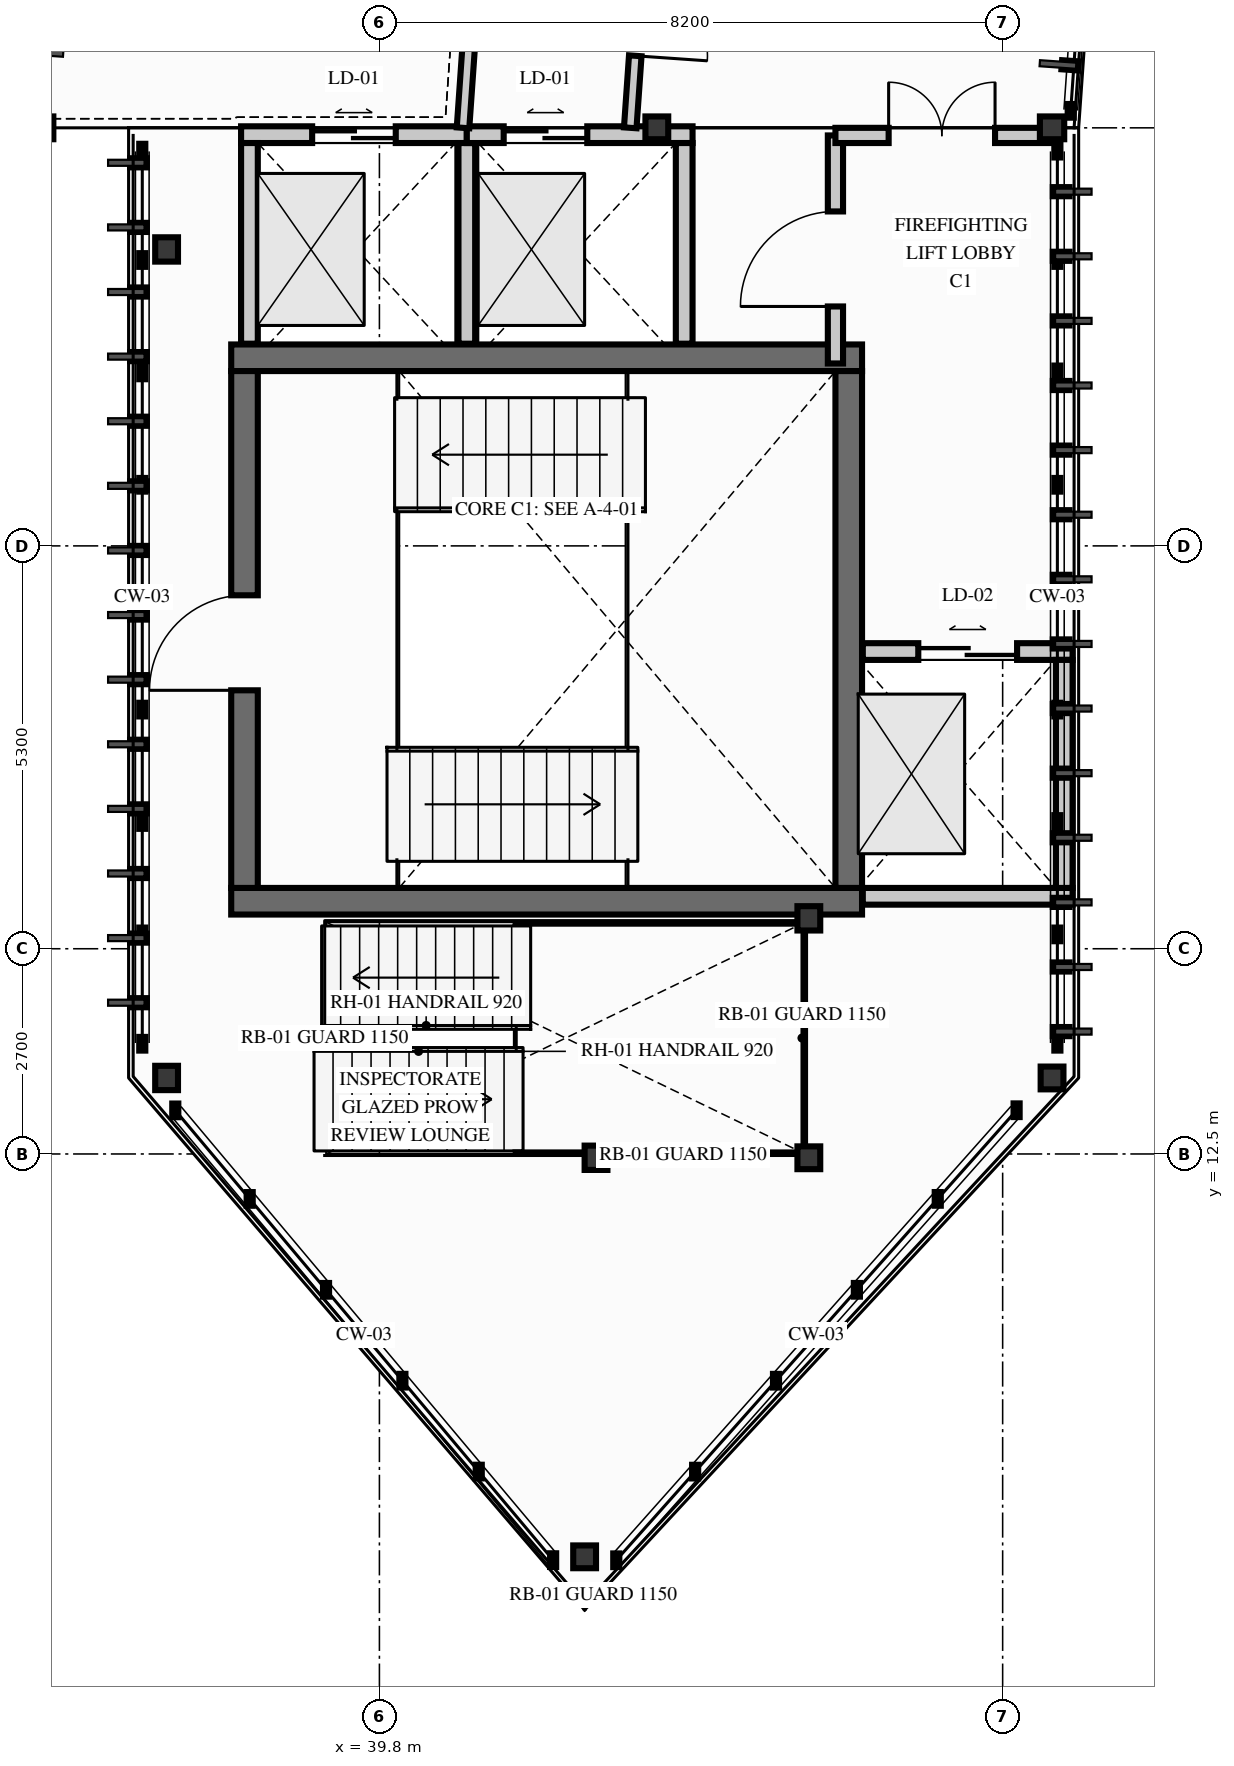
"""IFC4 building model, lengths in metres.
Left out: names, types, materials, properties, quantities, classifications, styles, units other than length and angle.
Written with IfcOpenShell. Run it as: python <this file> out.ifc"""

import sys

from ifc_helpers import new_model, si_unit, direction, frame, frame_2d, origin, origin_2d, place, context, subcontext, project, spatial, rectangle, i_section, extrude, element, fill, save


model = new_model("IFC4")
c1 = context("Model", 3, precision=1e-05, world=origin(), true_north=direction((0.0, 1.0)))
c2 = subcontext(c1, "Body", "Model", "MODEL_VIEW")
j1 = project(units=[si_unit("LENGTHUNIT", "METRE"), si_unit("PLANEANGLEUNIT", "RADIAN")], contexts=[c1])
p1 = place(None, origin())
s1 = spatial("IfcSite", under=j1, at=p1, CompositionType="ELEMENT")
p2 = place(p1, origin())
s2 = spatial("IfcBuilding", under=s1, at=p2, CompositionType="ELEMENT")
p3 = place(p2, frame((0.0, 0.0, 21.6)))
s3 = spatial("IfcBuildingStorey", under=s2, at=p3, CompositionType="ELEMENT", Elevation=21.6)
for number, where, z_axis, x_axis in (
    (1, (37.85, 15.825, 0.0), (0.0, 0.0, 1.0), (1.0, 0.0, 0.0)),
    (2, (37.85, 22.975, 0.0), (0.0, 0.0, 1.0), (1.0, 0.0, 0.0)),
):
    element("IfcWall", number, at=place(p3, frame(where, z_axis=z_axis, x_axis=x_axis)), inside=s3, PredefinedType="SHEAR", context=c2, shape_type="SweptSolid", body=[
        extrude(rectangle(XDim=8.3, YDim=0.35, at=frame_2d((4.15, 0.0))), origin(), (0.0, 0.0, 1.0), 3.7),
    ])
p4 = place(p3, frame((38.025, 16.0, 0.0), z_axis=(0.0, 0.0, 1.0), x_axis=(0.0, 1.0, 0.0)))
e3 = element("IfcWall", 3, at=p4, inside=s3, PredefinedType="SHEAR", context=c2, shape_type="SweptSolid", body=[
    extrude(rectangle(XDim=6.8, YDim=0.35, at=frame_2d((3.4, 0.0))), origin(), (0.0, 0.0, 1.0), 3.7),
])
p5 = place(p4, frame((2.6, 0.0, 0.0)))
e4 = element("IfcOpeningElement", 4, at=p5, cuts=e3, PredefinedType="OPENING", context=c2, shape_type="SweptSolid", body=[
    extrude(rectangle(XDim=1.25, YDim=2.2, at=frame_2d((0.625, 1.1))), frame((0.0, 0.185, 0.0), z_axis=(0.0, -1.0, 0.0), x_axis=(1.0, 0.0, 0.0)), (0.0, 0.0, 1.0), 0.37),
])
p6 = place(p3, frame((45.975, 16.0, 0.0), z_axis=(0.0, 0.0, 1.0), x_axis=(0.0, 1.0, 0.0)))
e5 = element("IfcWall", 5, at=p6, inside=s3, PredefinedType="SHEAR", context=c2, shape_type="SweptSolid", body=[
    extrude(rectangle(XDim=6.8, YDim=0.35, at=frame_2d((3.4, 0.0))), origin(), (0.0, 0.0, 1.0), 3.7),
])
p7 = place(p3, frame((48.65, 26.0, 0.0), z_axis=(0.0, 0.0, 1.0), x_axis=(0.0, 1.0, 0.0)))
e6 = element("IfcColumn", 6, at=p7, inside=s3, PredefinedType="COLUMN", context=c2, shape_type="SweptSolid", body=[
    extrude(i_section(OverallWidth=0.3, OverallDepth=0.32, WebThickness=0.011, FlangeThickness=0.021, FilletRadius=0.027, at=origin_2d()), origin(), (0.0, 0.0, 1.0), 3.9),
])
p8 = place(p3, frame((43.45, 26.0, 0.0), z_axis=(0.0, 0.0, 1.0), x_axis=(0.0, 1.0, 0.0)))
e7 = element("IfcColumn", 7, at=p8, inside=s3, PredefinedType="COLUMN", context=c2, shape_type="SweptSolid", body=[
    extrude(i_section(OverallWidth=0.3, OverallDepth=0.3, WebThickness=0.011, FlangeThickness=0.019, FilletRadius=0.027, at=origin_2d()), origin(), (0.0, 0.0, 1.0), 3.9),
])
for number, where, z_axis, x_axis in (
    (8, (35.35, 26.0, 0.0), (0.0, 0.0, 1.0), (0.0, 1.0, 0.0)),
    (9, (37.0, 24.4, 0.0), (0.0, 0.0, 1.0), (1.0, 0.0, 0.0)),
):
    element("IfcColumn", number, at=place(p3, frame(where, z_axis=z_axis, x_axis=x_axis)), inside=s3, PredefinedType="COLUMN", context=c2, shape_type="SweptSolid", body=[
        extrude(i_section(OverallWidth=0.3, OverallDepth=0.32, WebThickness=0.011, FlangeThickness=0.021, FilletRadius=0.027, at=origin_2d()), origin(), (0.0, 0.0, 1.0), 3.9),
    ])
p9 = place(p3, frame((48.65, 13.5, 0.0), z_axis=(0.0, 0.0, 1.0), x_axis=(1.0, 0.0, 0.0)))
e10 = element("IfcColumn", 10, at=p9, inside=s3, PredefinedType="COLUMN", context=c2, shape_type="SweptSolid", body=[
    extrude(i_section(OverallWidth=0.3, OverallDepth=0.3, WebThickness=0.011, FlangeThickness=0.019, FilletRadius=0.027, at=origin_2d()), origin(), (0.0, 0.0, 1.0), 3.9),
])
p10 = place(p3, frame((37.0, 13.5, 0.0), z_axis=(0.0, 0.0, 1.0), x_axis=(1.0, 0.0, 0.0)))
e11 = element("IfcColumn", 11, at=p10, inside=s3, PredefinedType="COLUMN", context=c2, shape_type="SweptSolid", body=[
    extrude(i_section(OverallWidth=0.3, OverallDepth=0.32, WebThickness=0.011, FlangeThickness=0.021, FilletRadius=0.027, at=origin_2d()), origin(), (0.0, 0.0, 1.0), 3.9),
])
p11 = place(p3, frame((42.5, 7.2, 0.0), z_axis=(0.0, 0.0, 1.0), x_axis=(1.0, 0.0, 0.0)))
e12 = element("IfcColumn", 12, at=p11, inside=s3, PredefinedType="COLUMN", context=c2, shape_type="SweptSolid", body=[
    extrude(i_section(OverallWidth=0.3, OverallDepth=0.3, WebThickness=0.011, FlangeThickness=0.019, FilletRadius=0.027, at=origin_2d()), origin(), (0.0, 0.0, 1.0), 3.9),
])
p12 = place(p3, frame((42.65, 12.45, 0.0), z_axis=(0.0, 0.0, 1.0), x_axis=(1.0, 0.0, 0.0)))
e13 = element("IfcColumn", 13, at=p12, inside=s3, PredefinedType="COLUMN", context=c2, shape_type="SweptSolid", body=[
    extrude(i_section(OverallWidth=0.3, OverallDepth=0.32, WebThickness=0.011, FlangeThickness=0.021, FilletRadius=0.027, at=origin_2d()), origin(), (0.0, 0.0, 1.0), 3.9),
])
p13 = place(p3, frame((45.45, 12.45, 0.0), z_axis=(0.0, 0.0, 1.0), x_axis=(1.0, 0.0, 0.0)))
e14 = element("IfcColumn", 14, at=p13, inside=s3, PredefinedType="COLUMN", context=c2, shape_type="SweptSolid", body=[
    extrude(i_section(OverallWidth=0.3, OverallDepth=0.3, WebThickness=0.011, FlangeThickness=0.019, FilletRadius=0.027, at=origin_2d()), origin(), (0.0, 0.0, 1.0), 3.9),
])
p14 = place(p3, frame((45.45, 15.6, 0.0), z_axis=(0.0, 0.0, 1.0), x_axis=(1.0, 0.0, 0.0)))
e15 = element("IfcColumn", 15, at=p14, inside=s3, PredefinedType="COLUMN", context=c2, shape_type="SweptSolid", body=[
    extrude(i_section(OverallWidth=0.3, OverallDepth=0.32, WebThickness=0.011, FlangeThickness=0.021, FilletRadius=0.027, at=origin_2d()), origin(), (0.0, 0.0, 1.0), 3.9),
])
p15 = place(p3, frame((46.16, 15.89, 0.0), z_axis=(0.0, 0.0, 1.0), x_axis=(1.0, 0.0, 0.0)))
e16 = element("IfcWall", 16, at=p15, inside=s3, PredefinedType="PARTITIONING", context=c2, shape_type="SweptSolid", body=[
    extrude(rectangle(XDim=2.76, YDim=0.22, at=frame_2d((1.38, 0.0))), origin(), (0.0, 0.0, 1.0), 3.338),
])
p16 = place(p3, frame((46.16, 19.11, 0.0), z_axis=(0.0, 0.0, 1.0), x_axis=(1.0, 0.0, 0.0)))
e17 = element("IfcWall", 17, at=p16, inside=s3, PredefinedType="PARTITIONING", context=c2, shape_type="SweptSolid", body=[
    extrude(rectangle(XDim=2.76, YDim=0.22, at=frame_2d((1.38, 0.0))), origin(), (0.0, 0.0, 1.0), 3.338),
])
p17 = place(p16, frame((0.73, 0.0, 0.0)))
e18 = element("IfcOpeningElement", 18, at=p17, cuts=e17, PredefinedType="OPENING", context=c2, shape_type="SweptSolid", body=[
    extrude(rectangle(XDim=1.3, YDim=2.2, at=frame_2d((0.65, 1.1))), frame((0.0, 0.12, 0.0), z_axis=(0.0, -1.0, 0.0), x_axis=(1.0, 0.0, 0.0)), (0.0, 0.0, 1.0), 0.24),
])
p18 = place(p3, frame((48.81, 16.0, 0.0), z_axis=(0.0, 0.0, 1.0), x_axis=(0.0, 1.0, 0.0)))
e19 = element("IfcWall", 19, at=p18, inside=s3, PredefinedType="PARTITIONING", context=c2, shape_type="SweptSolid", body=[
    extrude(rectangle(XDim=3.0, YDim=0.22, at=frame_2d((1.5, 0.0))), origin(), (0.0, 0.0, 1.0), 3.34),
])
p19 = place(p3, frame((37.98, 25.91, 0.0), z_axis=(0.0, 0.0, 1.0), x_axis=(1.0, 0.0, 0.0)))
e20 = element("IfcWall", 20, at=p19, inside=s3, PredefinedType="PARTITIONING", context=c2, shape_type="SweptSolid", body=[
    extrude(rectangle(XDim=2.97, YDim=0.22, at=frame_2d((1.485, 0.0))), origin(), (0.0, 0.0, 1.0), 3.25),
])
p20 = place(p19, frame((0.935, 0.0, 0.0)))
e21 = element("IfcOpeningElement", 21, at=p20, cuts=e20, PredefinedType="OPENING", context=c2, shape_type="SweptSolid", body=[
    extrude(rectangle(XDim=1.1, YDim=2.15, at=frame_2d((0.55, 1.075))), frame((0.0, 0.12, 0.0), z_axis=(0.0, -1.0, 0.0), x_axis=(1.0, 0.0, 0.0)), (0.0, 0.0, 1.0), 0.24),
])
for number, where, z_axis, x_axis in (
    (22, (38.09, 23.16, 0.0), (0.0, 0.0, 1.0), (0.0, 1.0, 0.0)),
    (23, (40.95, 23.16, 0.0), (0.0, 0.0, 1.0), (0.0, 1.0, 0.0)),
):
    element("IfcWall", number, at=place(p3, frame(where, z_axis=z_axis, x_axis=x_axis)), inside=s3, PredefinedType="PARTITIONING", context=c2, shape_type="SweptSolid", body=[
        extrude(rectangle(XDim=2.64, YDim=0.22, at=frame_2d((1.32, 0.0))), origin(), (0.0, 0.0, 1.0), 3.62),
    ])
p21 = place(p3, frame((40.95, 25.91, 0.0), z_axis=(0.0, 0.0, 1.0), x_axis=(1.0, 0.0, 0.0)))
e24 = element("IfcWall", 24, at=p21, inside=s3, PredefinedType="PARTITIONING", context=c2, shape_type="SweptSolid", body=[
    extrude(rectangle(XDim=2.97, YDim=0.22, at=frame_2d((1.485, 0.0))), origin(), (0.0, 0.0, 1.0), 3.25),
])
p22 = place(p21, frame((0.485, 0.0, 0.0)))
e25 = element("IfcOpeningElement", 25, at=p22, cuts=e24, PredefinedType="OPENING", context=c2, shape_type="SweptSolid", body=[
    extrude(rectangle(XDim=1.1, YDim=2.15, at=frame_2d((0.55, 1.075))), frame((0.0, 0.12, 0.0), z_axis=(0.0, -1.0, 0.0), x_axis=(1.0, 0.0, 0.0)), (0.0, 0.0, 1.0), 0.24),
])
p23 = place(p3, frame((43.81, 23.16, 0.0), z_axis=(0.0, 0.0, 1.0), x_axis=(0.0, 1.0, 0.0)))
e26 = element("IfcWall", 26, at=p23, inside=s3, PredefinedType="PARTITIONING", context=c2, shape_type="SweptSolid", body=[
    extrude(rectangle(XDim=2.64, YDim=0.22, at=frame_2d((1.32, 0.0))), origin(), (0.0, 0.0, 1.0), 3.62),
])
p24 = place(p3, frame((45.8, 22.9, 0.0), z_axis=(0.0, 0.0, 1.0), x_axis=(0.0, 1.0, 0.0)))
e27 = element("IfcWall", 27, at=p24, inside=s3, PredefinedType="PARTITIONING", context=c2, shape_type="SweptSolid", body=[
    extrude(rectangle(XDim=3.0, YDim=0.2, at=frame_2d((1.5, 0.0))), origin(), (0.0, 0.0, 1.0), 3.62),
])
p25 = place(p24, frame((0.75, 0.0, 0.0)))
e28 = element("IfcOpeningElement", 28, at=p25, cuts=e27, PredefinedType="OPENING", context=c2, shape_type="SweptSolid", body=[
    extrude(rectangle(XDim=1.25, YDim=2.2, at=frame_2d((0.625, 1.1))), frame((0.0, 0.11, 0.0), z_axis=(0.0, -1.0, 0.0), x_axis=(1.0, 0.0, 0.0)), (0.0, 0.0, 1.0), 0.22),
])
p26 = place(p3, frame((45.8, 25.9, 0.0), z_axis=(0.0, 0.0, 1.0), x_axis=(1.0, 0.0, 0.0)))
e29 = element("IfcWall", 29, at=p26, inside=s3, PredefinedType="PARTITIONING", context=c2, shape_type="SweptSolid", body=[
    extrude(rectangle(XDim=2.85, YDim=0.2, at=frame_2d((1.425, 0.0))), origin(), (0.0, 0.0, 1.0), 3.3),
])
p27 = place(p26, frame((0.7, 0.0, 0.0)))
e30 = element("IfcOpeningElement", 30, at=p27, cuts=e29, PredefinedType="OPENING", context=c2, shape_type="SweptSolid", body=[
    extrude(rectangle(XDim=1.4, YDim=2.25, at=frame_2d((0.7, 1.125))), frame((0.0, 0.11, 0.0), z_axis=(0.0, -1.0, 0.0), x_axis=(1.0, 0.0, 0.0)), (0.0, 0.0, 1.0), 0.22),
])
p28 = place(p3, frame((43.595, 33.084, 0.0), z_axis=(0.0, 0.0, 1.0), x_axis=(-0.069756597752, -0.997564041588, 0.0)))
e31 = element("IfcWall", 31, at=p28, inside=s3, PredefinedType="PARTITIONING", context=c2, shape_type="SweptSolid", body=[
    extrude(rectangle(XDim=7.101, YDim=0.165, at=frame_2d((3.551, 0.0))), origin(), (0.0, 0.0, 1.0), 3.62),
])
p29 = place(p28, frame((5.201, 0.0, 0.0)))
e32 = element("IfcOpeningElement", 32, at=p29, cuts=e31, PredefinedType="OPENING", context=c2, shape_type="SweptSolid", body=[
    extrude(rectangle(XDim=0.95, YDim=2.15, at=frame_2d((0.475, 1.075))), frame((0.0, 0.093, 0.0), z_axis=(0.0, -1.0, 0.0), x_axis=(1.0, 0.0, 0.0)), (0.0, 0.0, 1.0), 0.185),
])
p30 = place(p28, frame((0.75, 0.0, 0.0)))
e33 = element("IfcOpeningElement", 33, at=p30, cuts=e31, PredefinedType="OPENING", context=c2, shape_type="SweptSolid", body=[
    extrude(rectangle(XDim=1.08, YDim=2.22, at=frame_2d((0.54, 1.11))), frame((0.0, 0.093, 0.0), z_axis=(0.0, -1.0, 0.0), x_axis=(1.0, 0.0, 0.0)), (0.0, 0.0, 1.0), 0.185),
])
p31 = place(p3, frame((41.417, 33.39, 0.0), z_axis=(0.0, 0.0, 1.0), x_axis=(-0.069766817412, -0.997563326906, 0.0)))
e34 = element("IfcWall", 34, at=p31, inside=s3, PredefinedType="PARTITIONING", context=c2, shape_type="SweptSolid", body=[
    extrude(rectangle(XDim=7.408, YDim=0.165, at=frame_2d((3.704, 0.0))), origin(), (0.0, 0.0, 1.0), 3.62),
])
p32 = place(p31, frame((3.111, 0.0, 0.0)))
e35 = element("IfcOpeningElement", 35, at=p32, cuts=e34, PredefinedType="OPENING", context=c2, shape_type="SweptSolid", body=[
    extrude(rectangle(XDim=1.76, YDim=2.36, at=frame_2d((0.88, 1.18))), frame((0.0, 0.093, 0.0), z_axis=(0.0, -1.0, 0.0), x_axis=(1.0, 0.0, 0.0)), (0.0, 0.0, 1.0), 0.185),
])
p33 = place(p5, origin())
e36 = element("IfcDoor", 36, at=p33, inside=s3, OperationType="SINGLE_SWING_LEFT", PredefinedType="DOOR", context=c2, shape_type="SweptSolid", body=[
    extrude(rectangle(XDim=1.25, YDim=2.2, at=frame_2d((0.625, 1.1))), frame((0.0, 0.025, 0.0), z_axis=(0.0, -1.0, 0.0), x_axis=(1.0, 0.0, 0.0)), (0.0, 0.0, 1.0), 0.05),
])
fill(e4, e36)
p34 = place(p17, origin())
e37 = element("IfcDoor", 37, at=p34, inside=s3, OperationType="DOUBLE_DOOR_SLIDING", PredefinedType="DOOR", context=c2, shape_type="SweptSolid", body=[
    extrude(rectangle(XDim=1.3, YDim=2.2, at=frame_2d((0.65, 1.1))), frame((0.0, 0.025, 0.0), z_axis=(0.0, -1.0, 0.0), x_axis=(1.0, 0.0, 0.0)), (0.0, 0.0, 1.0), 0.05),
])
fill(e18, e37)
p35 = place(p20, origin())
e38 = element("IfcDoor", 38, at=p35, inside=s3, OperationType="DOUBLE_DOOR_SLIDING", PredefinedType="DOOR", context=c2, shape_type="SweptSolid", body=[
    extrude(rectangle(XDim=1.1, YDim=2.15, at=frame_2d((0.55, 1.075))), frame((0.0, 0.025, 0.0), z_axis=(0.0, -1.0, 0.0), x_axis=(1.0, 0.0, 0.0)), (0.0, 0.0, 1.0), 0.05),
])
fill(e21, e38)
p36 = place(p22, origin())
e39 = element("IfcDoor", 39, at=p36, inside=s3, OperationType="DOUBLE_DOOR_SLIDING", PredefinedType="DOOR", context=c2, shape_type="SweptSolid", body=[
    extrude(rectangle(XDim=1.1, YDim=2.15, at=frame_2d((0.55, 1.075))), frame((0.0, 0.025, 0.0), z_axis=(0.0, -1.0, 0.0), x_axis=(1.0, 0.0, 0.0)), (0.0, 0.0, 1.0), 0.05),
])
fill(e25, e39)
p37 = place(p27, origin())
e40 = element("IfcDoor", 40, at=p37, inside=s3, OperationType="DOUBLE_DOOR_SINGLE_SWING", PredefinedType="DOOR", context=c2, shape_type="SweptSolid", body=[
    extrude(rectangle(XDim=1.4, YDim=2.25, at=frame_2d((0.7, 1.125))), frame((0.0, 0.025, 0.0), z_axis=(0.0, -1.0, 0.0), x_axis=(1.0, 0.0, 0.0)), (0.0, 0.0, 1.0), 0.05),
])
fill(e30, e40)
p38 = place(p25, origin())
e41 = element("IfcDoor", 41, at=p38, inside=s3, OperationType="SINGLE_SWING_LEFT", PredefinedType="DOOR", context=c2, shape_type="SweptSolid", body=[
    extrude(rectangle(XDim=1.25, YDim=2.2, at=frame_2d((0.625, 1.1))), frame((0.0, 0.025, 0.0), z_axis=(0.0, -1.0, 0.0), x_axis=(1.0, 0.0, 0.0)), (0.0, 0.0, 1.0), 0.05),
])
fill(e28, e41)
p39 = place(p29, origin())
e42 = element("IfcDoor", 42, at=p39, inside=s3, OperationType="SINGLE_SWING_RIGHT", PredefinedType="DOOR", context=c2, shape_type="SweptSolid", body=[
    extrude(rectangle(XDim=0.95, YDim=2.15, at=frame_2d((0.475, 1.075))), frame((0.0, 0.025, 0.0), z_axis=(0.0, -1.0, 0.0), x_axis=(1.0, 0.0, 0.0)), (0.0, 0.0, 1.0), 0.05),
])
fill(e32, e42)
save(model, sys.argv[1])
